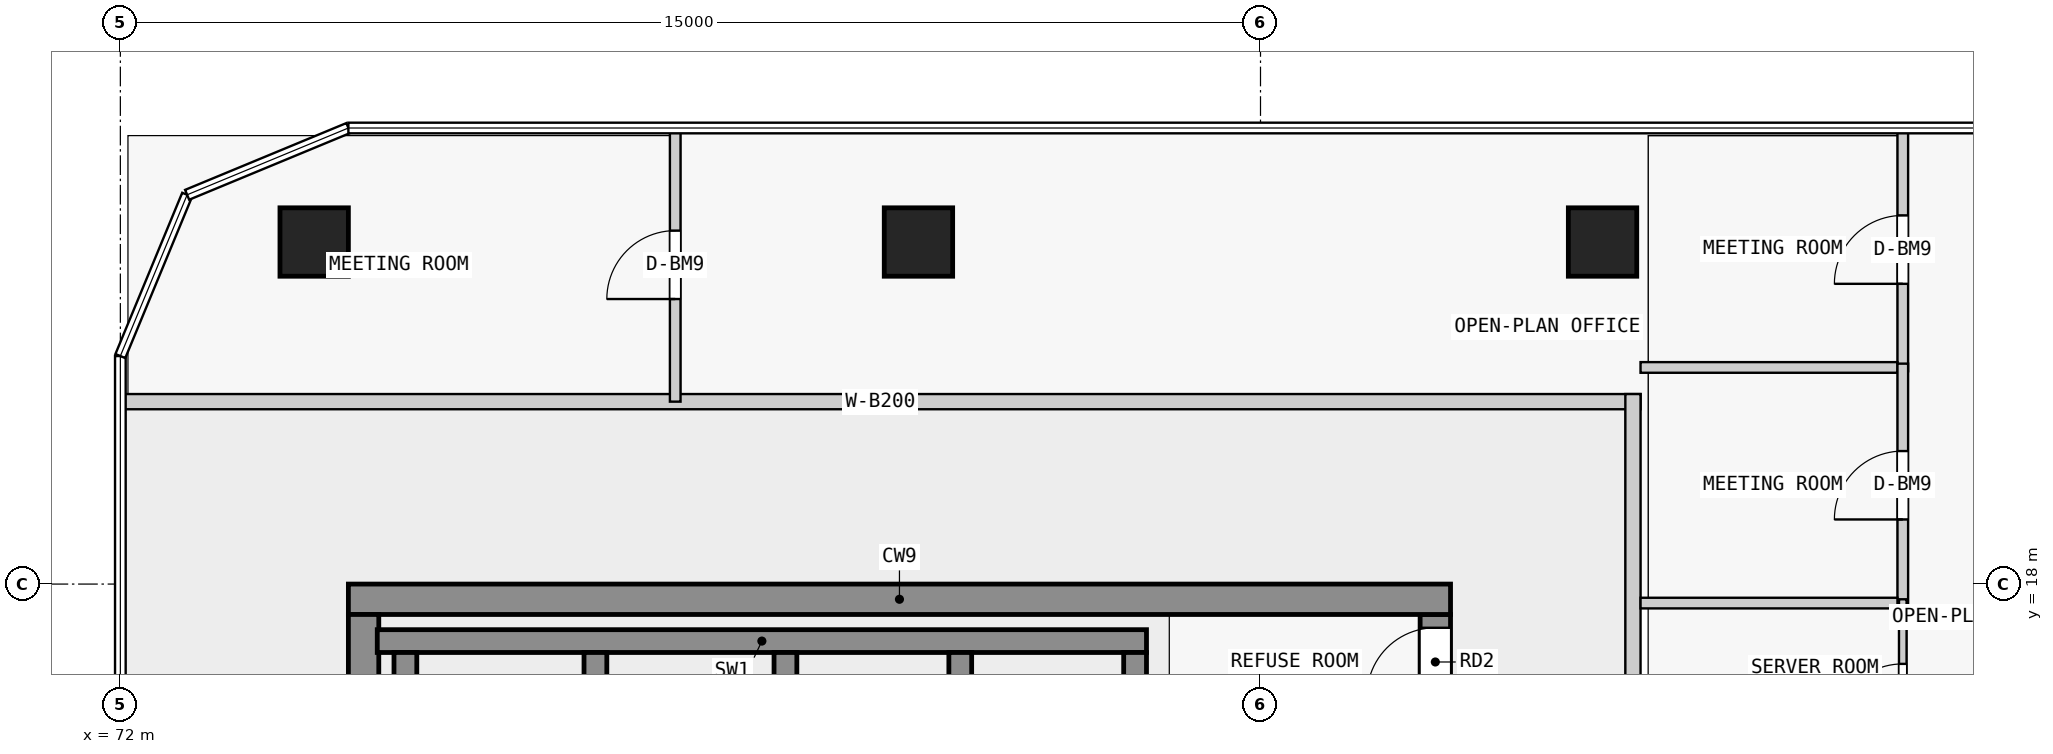
"""IFC4 building model, lengths in metres.
Left out: names, types, materials, properties, quantities, classifications, styles, units other than length and angle.
Written with IfcOpenShell. Run it as: python <this file> out.ifc"""

import sys

from ifc_helpers import new_model, si_unit, direction, frame, frame_2d, origin, origin_2d, place, context, subcontext, project, spatial, rectangle, extrude, element, fill, save


model = new_model("IFC4")
c1 = context("Model", 3, precision=1e-05, world=origin(), true_north=direction((0.0, 1.0)))
c2 = subcontext(c1, "Body", "Model", "MODEL_VIEW")
j1 = project(units=[si_unit("LENGTHUNIT", "METRE"), si_unit("PLANEANGLEUNIT", "RADIAN")], contexts=[c1])
p1 = place(None, origin())
s1 = spatial("IfcSite", under=j1, at=p1, CompositionType="ELEMENT")
p2 = place(p1, origin())
s2 = spatial("IfcBuilding", under=s1, at=p2, CompositionType="ELEMENT")
p3 = place(p2, frame((0.0, 0.0, 92.3)))
s3 = spatial("IfcBuildingStorey", under=s2, at=p3, CompositionType="ELEMENT", Elevation=92.3)
for number, where, z_axis, x_axis in (
    (1, (91.5, 22.5, 0.0), (0.0, 0.0, 1.0), (1.0, 0.0, 0.0)),
    (2, (82.5, 22.5, 0.0), (0.0, 0.0, 1.0), (1.0, 0.0, 0.0)),
    (3, (74.55, 22.5, 0.0), (0.0, 0.0, 1.0), (1.0, 0.0, 0.0)),
):
    element("IfcColumn", number, at=place(p3, frame(where, z_axis=z_axis, x_axis=x_axis)), inside=s3, PredefinedType="COLUMN", context=c2, shape_type="SweptSolid", body=[
        extrude(rectangle(XDim=0.9, YDim=0.9, at=origin_2d()), origin(), (0.0, 0.0, 1.0), 3.5),
    ])
p4 = place(p3, frame((75.0, 17.8, 0.0), z_axis=(0.0, 0.0, 1.0), x_axis=(1.0, 0.0, 0.0)))
e4 = element("IfcWall", 4, at=p4, inside=s3, PredefinedType="SHEAR", context=c2, shape_type="SweptSolid", body=[
    extrude(rectangle(XDim=14.5, YDim=0.4, at=frame_2d((7.25, 0.0))), origin(), (0.0, 0.0, 1.0), 3.25),
])
p5 = place(p3, frame((75.2, 0.4, 0.0), z_axis=(0.0, 0.0, 1.0), x_axis=(0.0, 1.0, 0.0)))
e5 = element("IfcWall", 5, at=p5, inside=s3, PredefinedType="SHEAR", context=c2, shape_type="SweptSolid", body=[
    extrude(rectangle(XDim=17.2, YDim=0.4, at=frame_2d((8.6, 0.0))), origin(), (0.0, 0.0, 1.0), 3.25),
])
p6 = place(p5, frame((7.9, 0.0, 0.0)))
e6 = element("IfcOpeningElement", 6, at=p6, cuts=e5, PredefinedType="OPENING", context=c2, shape_type="SweptSolid", body=[
    extrude(rectangle(XDim=1.8, YDim=2.1, at=frame_2d((0.9, 1.05))), frame((0.0, 0.21, 0.0), z_axis=(0.0, -1.0, 0.0), x_axis=(1.0, 0.0, 0.0)), (0.0, 0.0, 1.0), 0.42),
])
p7 = place(p3, frame((89.3, 0.4, 0.0), z_axis=(0.0, 0.0, 1.0), x_axis=(0.0, 1.0, 0.0)))
e7 = element("IfcWall", 7, at=p7, inside=s3, PredefinedType="SHEAR", context=c2, shape_type="SweptSolid", body=[
    extrude(rectangle(XDim=17.2, YDim=0.4, at=frame_2d((8.6, 0.0))), origin(), (0.0, 0.0, 1.0), 3.25),
])
p8 = place(p7, frame((7.7, 0.0, 0.0)))
e8 = element("IfcOpeningElement", 8, at=p8, cuts=e7, PredefinedType="OPENING", context=c2, shape_type="SweptSolid", body=[
    extrude(rectangle(XDim=1.8, YDim=2.1, at=frame_2d((0.9, 1.05))), frame((0.0, 0.21, 0.0), z_axis=(0.0, -1.0, 0.0), x_axis=(1.0, 0.0, 0.0)), (0.0, 0.0, 1.0), 0.42),
])
p9 = place(p7, frame((16.125, 0.0, 0.0)))
e9 = element("IfcOpeningElement", 9, at=p9, cuts=e7, PredefinedType="OPENING", context=c2, shape_type="SweptSolid", body=[
    extrude(rectangle(XDim=0.9, YDim=2.1, at=frame_2d((0.45, 1.05))), frame((0.0, 0.21, 0.0), z_axis=(0.0, -1.0, 0.0), x_axis=(1.0, 0.0, 0.0)), (0.0, 0.0, 1.0), 0.42),
])
p10 = place(p3, frame((75.38, 17.25, 0.0), z_axis=(0.0, 0.0, 1.0), x_axis=(1.0, 0.0, 0.0)))
e10 = element("IfcWall", 10, at=p10, inside=s3, PredefinedType="SHEAR", context=c2, shape_type="SweptSolid", body=[
    extrude(rectangle(XDim=10.12, YDim=0.3, at=frame_2d((5.06, 0.0))), origin(), (0.0, 0.0, 1.0), 3.25),
])
for number, where, z_axis, x_axis in (
    (11, (75.75, 14.3, 0.0), (0.0, 0.0, 1.0), (0.0, 1.0, 0.0)),
    (12, (78.25, 14.3, 0.0), (0.0, 0.0, 1.0), (0.0, 1.0, 0.0)),
    (13, (80.75, 14.3, 0.0), (0.0, 0.0, 1.0), (0.0, 1.0, 0.0)),
    (14, (83.05, 14.3, 0.0), (0.0, 0.0, 1.0), (0.0, 1.0, 0.0)),
    (15, (85.35, 14.3, 0.0), (0.0, 0.0, 1.0), (0.0, 1.0, 0.0)),
):
    element("IfcWall", number, at=place(p3, frame(where, z_axis=z_axis, x_axis=x_axis)), inside=s3, PredefinedType="SHEAR", context=c2, shape_type="SweptSolid", body=[
        extrude(rectangle(XDim=2.8, YDim=0.3, at=frame_2d((1.4, 0.0))), origin(), (0.0, 0.0, 1.0), 3.25),
    ])
p11 = place(p3, frame((72.0, 20.4, 0.0), z_axis=(0.0, 0.0, 1.0), x_axis=(1.0, 0.0, 0.0)))
e16 = element("IfcWall", 16, at=p11, inside=s3, PredefinedType="PARTITIONING", context=c2, shape_type="SweptSolid", body=[
    extrude(rectangle(XDim=20.0, YDim=0.2, at=frame_2d((10.0, 0.0))), origin(), (0.0, 0.0, 1.0), 3.25),
])
p12 = place(p3, frame((91.9, 12.2, 0.0), z_axis=(0.0, 0.0, 1.0), x_axis=(0.0, 1.0, 0.0)))
e17 = element("IfcWall", 17, at=p12, inside=s3, PredefinedType="PARTITIONING", context=c2, shape_type="SweptSolid", body=[
    extrude(rectangle(XDim=8.3, YDim=0.2, at=frame_2d((4.15, 0.0))), origin(), (0.0, 0.0, 1.0), 3.25),
])
p13 = place(p12, frame((1.0, 0.0, 0.0)))
e18 = element("IfcOpeningElement", 18, at=p13, cuts=e17, PredefinedType="OPENING", context=c2, shape_type="SweptSolid", body=[
    extrude(rectangle(XDim=1.4, YDim=2.4, at=frame_2d((0.7, 1.2))), frame((0.0, 0.11, 0.0), z_axis=(0.0, -1.0, 0.0), x_axis=(1.0, 0.0, 0.0)), (0.0, 0.0, 1.0), 0.22),
])
p14 = place(p3, frame((95.45, 20.8, 0.0), z_axis=(0.0, 0.0, 1.0), x_axis=(0.0, 1.0, 0.0)))
e19 = element("IfcWall", 19, at=p14, inside=s3, PredefinedType="PARTITIONING", context=c2, shape_type="SweptSolid", body=[
    extrude(rectangle(XDim=3.2, YDim=0.14, at=frame_2d((1.6, 0.0))), origin(), (0.0, 0.0, 1.0), 3.25),
])
p15 = place(p14, frame((1.15, 0.0, 0.0)))
e20 = element("IfcOpeningElement", 20, at=p15, cuts=e19, PredefinedType="OPENING", context=c2, shape_type="SweptSolid", body=[
    extrude(rectangle(XDim=0.9, YDim=2.4, at=frame_2d((0.45, 1.2))), frame((0.0, 0.08, 0.0), z_axis=(0.0, -1.0, 0.0), x_axis=(1.0, 0.0, 0.0)), (0.0, 0.0, 1.0), 0.16),
])
p16 = place(p3, frame((92.0, 20.85, 0.0), z_axis=(0.0, 0.0, 1.0), x_axis=(1.0, 0.0, 0.0)))
e21 = element("IfcWall", 21, at=p16, inside=s3, PredefinedType="PARTITIONING", context=c2, shape_type="SweptSolid", body=[
    extrude(rectangle(XDim=3.38, YDim=0.14, at=frame_2d((1.69, 0.0))), origin(), (0.0, 0.0, 1.0), 3.25),
])
p17 = place(p3, frame((95.45, 17.7, 0.0), z_axis=(0.0, 0.0, 1.0), x_axis=(0.0, 1.0, 0.0)))
e22 = element("IfcWall", 22, at=p17, inside=s3, PredefinedType="PARTITIONING", context=c2, shape_type="SweptSolid", body=[
    extrude(rectangle(XDim=3.2, YDim=0.14, at=frame_2d((1.6, 0.0))), origin(), (0.0, 0.0, 1.0), 3.25),
])
p18 = place(p17, frame((1.15, 0.0, 0.0)))
e23 = element("IfcOpeningElement", 23, at=p18, cuts=e22, PredefinedType="OPENING", context=c2, shape_type="SweptSolid", body=[
    extrude(rectangle(XDim=0.9, YDim=2.4, at=frame_2d((0.45, 1.2))), frame((0.0, 0.08, 0.0), z_axis=(0.0, -1.0, 0.0), x_axis=(1.0, 0.0, 0.0)), (0.0, 0.0, 1.0), 0.16),
])
p19 = place(p3, frame((92.0, 17.75, 0.0), z_axis=(0.0, 0.0, 1.0), x_axis=(1.0, 0.0, 0.0)))
e24 = element("IfcWall", 24, at=p19, inside=s3, PredefinedType="PARTITIONING", context=c2, shape_type="SweptSolid", body=[
    extrude(rectangle(XDim=3.38, YDim=0.14, at=frame_2d((1.69, 0.0))), origin(), (0.0, 0.0, 1.0), 3.25),
])
p20 = place(p3, frame((95.45, 15.2, 0.0), z_axis=(0.0, 0.0, 1.0), x_axis=(0.0, 1.0, 0.0)))
e25 = element("IfcWall", 25, at=p20, inside=s3, PredefinedType="PARTITIONING", context=c2, shape_type="SweptSolid", body=[
    extrude(rectangle(XDim=2.6, YDim=0.1, at=frame_2d((1.3, 0.0))), origin(), (0.0, 0.0, 1.0), 3.25),
])
p21 = place(p20, frame((0.85, 0.0, 0.0)))
e26 = element("IfcOpeningElement", 26, at=p21, cuts=e25, PredefinedType="OPENING", context=c2, shape_type="SweptSolid", body=[
    extrude(rectangle(XDim=0.9, YDim=2.1, at=frame_2d((0.45, 1.05))), frame((0.0, 0.06, 0.0), z_axis=(0.0, -1.0, 0.0), x_axis=(1.0, 0.0, 0.0)), (0.0, 0.0, 1.0), 0.12),
])
p22 = place(p3, frame((79.3, 20.4, 0.0), z_axis=(0.0, 0.0, 1.0), x_axis=(0.0, 1.0, 0.0)))
e27 = element("IfcWall", 27, at=p22, inside=s3, PredefinedType="PARTITIONING", context=c2, shape_type="SweptSolid", body=[
    extrude(rectangle(XDim=3.6, YDim=0.14, at=frame_2d((1.8, 0.0))), origin(), (0.0, 0.0, 1.0), 3.25),
])
p23 = place(p22, frame((1.35, 0.0, 0.0)))
e28 = element("IfcOpeningElement", 28, at=p23, cuts=e27, PredefinedType="OPENING", context=c2, shape_type="SweptSolid", body=[
    extrude(rectangle(XDim=0.9, YDim=2.4, at=frame_2d((0.45, 1.2))), frame((0.0, 0.08, 0.0), z_axis=(0.0, -1.0, 0.0), x_axis=(1.0, 0.0, 0.0)), (0.0, 0.0, 1.0), 0.16),
])
p24 = place(p9, origin())
e29 = element("IfcDoor", 29, at=p24, inside=s3, OperationType="SINGLE_SWING_LEFT", PredefinedType="DOOR", context=c2, shape_type="SweptSolid", body=[
    extrude(rectangle(XDim=0.9, YDim=2.1, at=frame_2d((0.45, 1.05))), frame((0.0, 0.025, 0.0), z_axis=(0.0, -1.0, 0.0), x_axis=(1.0, 0.0, 0.0)), (0.0, 0.0, 1.0), 0.05),
])
fill(e9, e29)
p25 = place(p15, origin())
e30 = element("IfcDoor", 30, at=p25, inside=s3, OperationType="SINGLE_SWING_LEFT", PredefinedType="DOOR", context=c2, shape_type="SweptSolid", body=[
    extrude(rectangle(XDim=0.9, YDim=2.4, at=frame_2d((0.45, 1.2))), frame((0.0, 0.025, 0.0), z_axis=(0.0, -1.0, 0.0), x_axis=(1.0, 0.0, 0.0)), (0.0, 0.0, 1.0), 0.05),
])
fill(e20, e30)
p26 = place(p18, origin())
e31 = element("IfcDoor", 31, at=p26, inside=s3, OperationType="SINGLE_SWING_LEFT", PredefinedType="DOOR", context=c2, shape_type="SweptSolid", body=[
    extrude(rectangle(XDim=0.9, YDim=2.4, at=frame_2d((0.45, 1.2))), frame((0.0, 0.025, 0.0), z_axis=(0.0, -1.0, 0.0), x_axis=(1.0, 0.0, 0.0)), (0.0, 0.0, 1.0), 0.05),
])
fill(e23, e31)
p27 = place(p21, origin())
e32 = element("IfcDoor", 32, at=p27, inside=s3, OperationType="SINGLE_SWING_LEFT", PredefinedType="DOOR", context=c2, shape_type="SweptSolid", body=[
    extrude(rectangle(XDim=0.9, YDim=2.1, at=frame_2d((0.45, 1.05))), frame((0.0, 0.025, 0.0), z_axis=(0.0, -1.0, 0.0), x_axis=(1.0, 0.0, 0.0)), (0.0, 0.0, 1.0), 0.05),
])
fill(e26, e32)
p28 = place(p23, origin())
e33 = element("IfcDoor", 33, at=p28, inside=s3, OperationType="SINGLE_SWING_LEFT", PredefinedType="DOOR", context=c2, shape_type="SweptSolid", body=[
    extrude(rectangle(XDim=0.9, YDim=2.4, at=frame_2d((0.45, 1.2))), frame((0.0, 0.025, 0.0), z_axis=(0.0, -1.0, 0.0), x_axis=(1.0, 0.0, 0.0)), (0.0, 0.0, 1.0), 0.05),
])
fill(e28, e33)
save(model, sys.argv[1])
